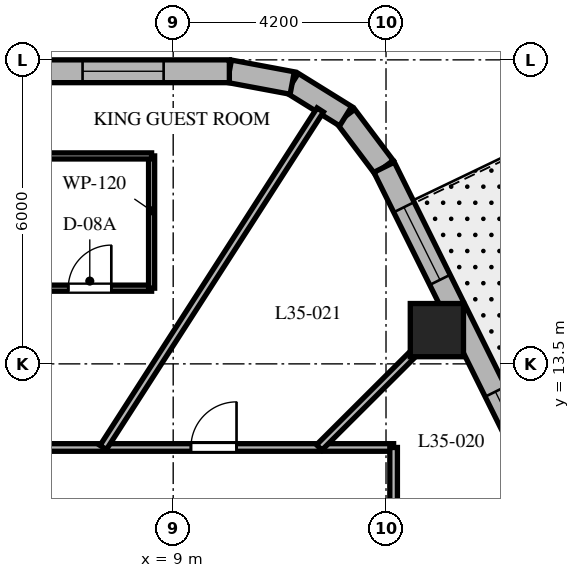
"""IFC4 building model, lengths in metres.
Left out: names, types, materials, properties, quantities, classifications, styles, units other than length and angle.
Written with IfcOpenShell. Run it as: python <this file> out.ifc"""

import sys

from ifc_helpers import new_model, si_unit, direction, frame, frame_2d, origin, origin_2d, place, context, subcontext, project, spatial, rectangle, extrude, element, fill, save


model = new_model("IFC4")
c1 = context("Model", 3, precision=1e-05, world=origin(), true_north=direction((0.0, 1.0)))
c2 = subcontext(c1, "Body", "Model", "MODEL_VIEW")
j1 = project(units=[si_unit("LENGTHUNIT", "METRE"), si_unit("PLANEANGLEUNIT", "RADIAN")], contexts=[c1])
p1 = place(None, origin())
s1 = spatial("IfcSite", under=j1, at=p1, CompositionType="ELEMENT")
p2 = place(p1, origin())
s2 = spatial("IfcBuilding", under=s1, at=p2, CompositionType="ELEMENT")
p3 = place(p2, frame((0.0, 0.0, 144.3)))
s3 = spatial("IfcBuildingStorey", under=s2, at=p3, CompositionType="ELEMENT", Elevation=144.3)
p4 = place(p3, frame((14.204, 14.166, 0.0), z_axis=(0.0, 0.0, 1.0), x_axis=(1.0, 0.0, 0.0)))
e1 = element("IfcColumn", 1, at=p4, inside=s3, PredefinedType="COLUMN", context=c2, shape_type="SweptSolid", body=[
    extrude(rectangle(XDim=1.05, YDim=1.05, at=origin_2d()), origin(), (0.0, 0.0, 1.0), 3.7),
])
p5 = place(p3, frame((13.162, 17.381, 0.0), z_axis=(0.0, 0.0, 1.0), x_axis=(-0.601515770517, 0.798860925205, 0.0)))
e2 = element("IfcWall", 2, at=p5, inside=s3, PredefinedType="SOLIDWALL", context=c2, shape_type="SweptSolid", body=[
    extrude(rectangle(XDim=1.262, YDim=0.45, at=frame_2d((0.631, 0.0))), origin(), (0.0, 0.0, 1.0), 3.4),
])
p6 = place(p3, frame((12.403, 18.389, 0.0), z_axis=(0.0, 0.0, 1.0), x_axis=(-0.849795170926, 0.527113049991, 0.0)))
e3 = element("IfcWall", 3, at=p6, inside=s3, PredefinedType="SOLIDWALL", context=c2, shape_type="SweptSolid", body=[
    extrude(rectangle(XDim=1.241, YDim=0.45, at=frame_2d((0.62, 0.0))), origin(), (0.0, 0.0, 1.0), 3.4),
])
p7 = place(p3, frame((11.349, 19.043, 0.0), z_axis=(0.0, 0.0, 1.0), x_axis=(-0.982931267051, 0.183973161772, 0.0)))
e4 = element("IfcWall", 4, at=p7, inside=s3, PredefinedType="SOLIDWALL", context=c2, shape_type="SweptSolid", body=[
    extrude(rectangle(XDim=1.262, YDim=0.45, at=frame_2d((0.631, 0.0))), origin(), (0.0, 0.0, 1.0), 3.4),
])
p8 = place(p3, frame((20.618, 2.344, 0.0), z_axis=(0.0, 0.0, 1.0), x_axis=(-0.444243691097, 0.895905990002, 0.0)))
e5 = element("IfcWall", 5, at=p8, inside=s3, PredefinedType="SOLIDWALL", context=c2, shape_type="SweptSolid", body=[
    extrude(rectangle(XDim=16.784, YDim=0.45, at=frame_2d((8.392, 0.0))), origin(), (0.0, 0.0, 1.0), 3.4),
])
p9 = place(p8, frame((4.535, 0.0, 0.0)))
e6 = element("IfcOpeningElement", 6, at=p9, cuts=e5, PredefinedType="OPENING", context=c2, shape_type="SweptSolid", body=[
    extrude(rectangle(XDim=1.0, YDim=2.15, at=frame_2d((0.5, 1.075))), frame((0.0, 0.235, 0.0), z_axis=(0.0, -1.0, 0.0), x_axis=(1.0, 0.0, 0.0)), (0.0, 0.0, 1.0), 0.47),
])
p10 = place(p8, frame((0.931, 0.0, 0.8)))
e7 = element("IfcOpeningElement", 7, at=p10, cuts=e5, PredefinedType="OPENING", context=c2, shape_type="SweptSolid", body=[
    extrude(rectangle(XDim=1.6, YDim=1.75, at=frame_2d((0.8, 0.875))), frame((0.0, 0.235, 0.0), z_axis=(0.0, -1.0, 0.0), x_axis=(1.0, 0.0, 0.0)), (0.0, 0.0, 1.0), 0.47),
])
p11 = place(p8, frame((6.25, 0.0, 0.8)))
e8 = element("IfcOpeningElement", 8, at=p11, cuts=e5, PredefinedType="OPENING", context=c2, shape_type="SweptSolid", body=[
    extrude(rectangle(XDim=1.6, YDim=1.75, at=frame_2d((0.8, 0.875))), frame((0.0, 0.235, 0.0), z_axis=(0.0, -1.0, 0.0), x_axis=(1.0, 0.0, 0.0)), (0.0, 0.0, 1.0), 0.47),
])
p12 = place(p8, frame((10.24, 0.0, 0.8)))
e9 = element("IfcOpeningElement", 9, at=p12, cuts=e5, PredefinedType="OPENING", context=c2, shape_type="SweptSolid", body=[
    extrude(rectangle(XDim=1.6, YDim=1.75, at=frame_2d((0.8, 0.875))), frame((0.0, 0.235, 0.0), z_axis=(0.0, -1.0, 0.0), x_axis=(1.0, 0.0, 0.0)), (0.0, 0.0, 1.0), 0.47),
])
p13 = place(p8, frame((14.303, 0.0, 0.8)))
e10 = element("IfcOpeningElement", 10, at=p13, cuts=e5, PredefinedType="OPENING", context=c2, shape_type="SweptSolid", body=[
    extrude(rectangle(XDim=1.6, YDim=1.75, at=frame_2d((0.8, 0.875))), frame((0.0, 0.235, 0.0), z_axis=(0.0, -1.0, 0.0), x_axis=(1.0, 0.0, 0.0)), (0.0, 0.0, 1.0), 0.47),
])
p14 = place(p3, frame((10.108, 19.275, 0.0), z_axis=(0.0, 0.0, 1.0), x_axis=(-1.0, 0.0, 0.0)))
e11 = element("IfcWall", 11, at=p14, inside=s3, PredefinedType="SOLIDWALL", context=c2, shape_type="SweptSolid", body=[
    extrude(rectangle(XDim=21.829, YDim=0.45, at=frame_2d((10.915, 0.0))), origin(), (0.0, 0.0, 1.0), 3.4),
])
p15 = place(p14, frame((1.297, 0.0, 0.8)))
e12 = element("IfcOpeningElement", 12, at=p15, cuts=e11, PredefinedType="OPENING", context=c2, shape_type="SweptSolid", body=[
    extrude(rectangle(XDim=1.6, YDim=1.75, at=frame_2d((0.8, 0.875))), frame((0.0, 0.235, 0.0), z_axis=(0.0, -1.0, 0.0), x_axis=(1.0, 0.0, 0.0)), (0.0, 0.0, 1.0), 0.47),
])
p16 = place(p14, frame((10.115, 0.0, 0.8)))
e13 = element("IfcOpeningElement", 13, at=p16, cuts=e11, PredefinedType="OPENING", context=c2, shape_type="SweptSolid", body=[
    extrude(rectangle(XDim=1.6, YDim=1.75, at=frame_2d((0.8, 0.875))), frame((0.0, 0.235, 0.0), z_axis=(0.0, -1.0, 0.0), x_axis=(1.0, 0.0, 0.0)), (0.0, 0.0, 1.0), 0.47),
])
p17 = place(p14, frame((18.933, 0.0, 0.8)))
e14 = element("IfcOpeningElement", 14, at=p17, cuts=e11, PredefinedType="OPENING", context=c2, shape_type="SweptSolid", body=[
    extrude(rectangle(XDim=1.6, YDim=1.75, at=frame_2d((0.8, 0.875))), frame((0.0, 0.235, 0.0), z_axis=(0.0, -1.0, 0.0), x_axis=(1.0, 0.0, 0.0)), (0.0, 0.0, 1.0), 0.47),
])
p18 = place(p3, frame((-13.35, 11.85, 0.0), z_axis=(0.0, 0.0, 1.0), x_axis=(1.0, 0.0, 0.0)))
e15 = element("IfcWall", 15, at=p18, inside=s3, PredefinedType="PARTITIONING", context=c2, shape_type="SweptSolid", body=[
    extrude(rectangle(XDim=26.7, YDim=0.15, at=frame_2d((13.35, 0.0))), origin(), (0.0, 0.0, 1.0), 2.84),
])
p19 = place(p18, frame((22.7, 0.0, 0.0)))
e16 = element("IfcOpeningElement", 16, at=p19, cuts=e15, PredefinedType="OPENING", context=c2, shape_type="SweptSolid", body=[
    extrude(rectangle(XDim=0.9, YDim=2.03, at=frame_2d((0.45, 1.015))), frame((0.0, 0.085, 0.0), z_axis=(0.0, -1.0, 0.0), x_axis=(1.0, 0.0, 0.0)), (0.0, 0.0, 1.0), 0.17),
])
p20 = place(p18, frame((18.523, 0.0, 0.0)))
e17 = element("IfcOpeningElement", 17, at=p20, cuts=e15, PredefinedType="OPENING", context=c2, shape_type="SweptSolid", body=[
    extrude(rectangle(XDim=0.95, YDim=2.03, at=frame_2d((0.475, 1.015))), frame((0.0, 0.085, 0.0), z_axis=(0.0, -1.0, 0.0), x_axis=(1.0, 0.0, 0.0)), (0.0, 0.0, 1.0), 0.17),
])
p21 = place(p18, frame((12.362, 0.0, 0.0)))
e18 = element("IfcOpeningElement", 18, at=p21, cuts=e15, PredefinedType="OPENING", context=c2, shape_type="SweptSolid", body=[
    extrude(rectangle(XDim=0.95, YDim=2.03, at=frame_2d((0.475, 1.015))), frame((0.0, 0.085, 0.0), z_axis=(0.0, -1.0, 0.0), x_axis=(1.0, 0.0, 0.0)), (0.0, 0.0, 1.0), 0.17),
])
p22 = place(p18, frame((6.061, 0.0, 0.0)))
e19 = element("IfcOpeningElement", 19, at=p22, cuts=e15, PredefinedType="OPENING", context=c2, shape_type="SweptSolid", body=[
    extrude(rectangle(XDim=0.95, YDim=2.03, at=frame_2d((0.475, 1.015))), frame((0.0, 0.085, 0.0), z_axis=(0.0, -1.0, 0.0), x_axis=(1.0, 0.0, 0.0)), (0.0, 0.0, 1.0), 0.17),
])
p23 = place(p18, frame((1.886, 0.0, 0.0)))
e20 = element("IfcOpeningElement", 20, at=p23, cuts=e15, PredefinedType="OPENING", context=c2, shape_type="SweptSolid", body=[
    extrude(rectangle(XDim=0.9, YDim=2.03, at=frame_2d((0.45, 1.015))), frame((0.0, 0.085, 0.0), z_axis=(0.0, -1.0, 0.0), x_axis=(1.0, 0.0, 0.0)), (0.0, 0.0, 1.0), 0.17),
])
p24 = place(p3, frame((13.35, 11.85, 0.0), z_axis=(0.0, 0.0, 1.0), x_axis=(0.0, -1.0, 0.0)))
e21 = element("IfcWall", 21, at=p24, inside=s3, PredefinedType="PARTITIONING", context=c2, shape_type="SweptSolid", body=[
    extrude(rectangle(XDim=23.7, YDim=0.15, at=frame_2d((11.85, 0.0))), origin(), (0.0, 0.0, 1.0), 2.84),
])
p25 = place(p24, frame((9.27, 0.0, 0.0)))
e22 = element("IfcOpeningElement", 22, at=p25, cuts=e21, PredefinedType="OPENING", context=c2, shape_type="SweptSolid", body=[
    extrude(rectangle(XDim=0.9, YDim=2.03, at=frame_2d((0.45, 1.015))), frame((0.0, 0.085, 0.0), z_axis=(0.0, -1.0, 0.0), x_axis=(1.0, 0.0, 0.0)), (0.0, 0.0, 1.0), 0.17),
])
p26 = place(p24, frame((5.393, 0.0, 0.0)))
e23 = element("IfcOpeningElement", 23, at=p26, cuts=e21, PredefinedType="OPENING", context=c2, shape_type="SweptSolid", body=[
    extrude(rectangle(XDim=0.9, YDim=2.03, at=frame_2d((0.45, 1.015))), frame((0.0, 0.085, 0.0), z_axis=(0.0, -1.0, 0.0), x_axis=(1.0, 0.0, 0.0)), (0.0, 0.0, 1.0), 0.17),
])
p27 = place(p24, frame((1.439, 0.0, 0.0)))
e24 = element("IfcOpeningElement", 24, at=p27, cuts=e21, PredefinedType="OPENING", context=c2, shape_type="SweptSolid", body=[
    extrude(rectangle(XDim=0.9, YDim=2.03, at=frame_2d((0.45, 1.015))), frame((0.0, 0.085, 0.0), z_axis=(0.0, -1.0, 0.0), x_axis=(1.0, 0.0, 0.0)), (0.0, 0.0, 1.0), 0.17),
])
p28 = place(p24, frame((18.389, 0.0, 0.0)))
e25 = element("IfcOpeningElement", 25, at=p28, cuts=e21, PredefinedType="OPENING", context=c2, shape_type="SweptSolid", body=[
    extrude(rectangle(XDim=0.95, YDim=2.03, at=frame_2d((0.475, 1.015))), frame((0.0, 0.085, 0.0), z_axis=(0.0, -1.0, 0.0), x_axis=(1.0, 0.0, 0.0)), (0.0, 0.0, 1.0), 0.17),
])
p29 = place(p24, frame((12.315, 0.0, 0.0)))
e26 = element("IfcOpeningElement", 26, at=p29, cuts=e21, PredefinedType="OPENING", context=c2, shape_type="SweptSolid", body=[
    extrude(rectangle(XDim=0.9, YDim=2.03, at=frame_2d((0.45, 1.015))), frame((0.0, 0.085, 0.0), z_axis=(0.0, -1.0, 0.0), x_axis=(1.0, 0.0, 0.0)), (0.0, 0.0, 1.0), 0.17),
])
p30 = place(p3, frame((11.882, 11.85, 0.0), z_axis=(0.0, 0.0, 1.0), x_axis=(0.708037373639, 0.706174962407, 0.0)))
e27 = element("IfcWall", 27, at=p30, inside=s3, PredefinedType="PARTITIONING", context=c2, shape_type="SweptSolid", body=[
    extrude(rectangle(XDim=3.802, YDim=0.15, at=frame_2d((1.901, 0.0))), origin(), (0.0, 0.0, 1.0), 2.64),
])
p31 = place(p3, frame((7.619, 11.85, 0.0), z_axis=(0.0, 0.0, 1.0), x_axis=(0.540829263478, 0.841132396098, 0.0)))
e28 = element("IfcWall", 28, at=p31, inside=s3, PredefinedType="PARTITIONING", context=c2, shape_type="SweptSolid", body=[
    extrude(rectangle(XDim=7.919, YDim=0.15, at=frame_2d((3.959, 0.0))), origin(), (0.0, 0.0, 1.0), 2.64),
])
p32 = place(p3, frame((6.134, 14.994, 0.0), z_axis=(0.0, 0.0, 1.0), x_axis=(1.0, 0.0, 0.0)))
e29 = element("IfcWall", 29, at=p32, inside=s3, PredefinedType="PARTITIONING", context=c2, shape_type="SweptSolid", body=[
    extrude(rectangle(XDim=2.44, YDim=0.12, at=frame_2d((1.22, 0.0))), origin(), (0.0, 0.0, 1.0), 3.4),
])
p33 = place(p32, frame((0.795, 0.0, 0.0)))
e30 = element("IfcOpeningElement", 30, at=p33, cuts=e29, PredefinedType="OPENING", context=c2, shape_type="SweptSolid", body=[
    extrude(rectangle(XDim=0.85, YDim=2.03, at=frame_2d((0.425, 1.015))), frame((0.0, 0.07, 0.0), z_axis=(0.0, -1.0, 0.0), x_axis=(1.0, 0.0, 0.0)), (0.0, 0.0, 1.0), 0.14),
])
p34 = place(p3, frame((8.574, 14.994, 0.0), z_axis=(0.0, 0.0, 1.0), x_axis=(0.0, 1.0, 0.0)))
e31 = element("IfcWall", 31, at=p34, inside=s3, PredefinedType="PARTITIONING", context=c2, shape_type="SweptSolid", body=[
    extrude(rectangle(XDim=2.61, YDim=0.12, at=frame_2d((1.305, 0.0))), origin(), (0.0, 0.0, 1.0), 2.64),
])
p35 = place(p3, frame((8.574, 17.604, 0.0), z_axis=(0.0, 0.0, 1.0), x_axis=(-1.0, 0.0, 0.0)))
e32 = element("IfcWall", 32, at=p35, inside=s3, PredefinedType="PARTITIONING", context=c2, shape_type="SweptSolid", body=[
    extrude(rectangle(XDim=2.44, YDim=0.12, at=frame_2d((1.22, 0.0))), origin(), (0.0, 0.0, 1.0), 2.64),
])
p36 = place(p12, origin())
e33 = element("IfcWindow", 33, at=p36, inside=s3, PartitioningType="SINGLE_PANEL", PredefinedType="WINDOW", context=c2, shape_type="SweptSolid", body=[
    extrude(rectangle(XDim=1.6, YDim=1.75, at=frame_2d((0.8, 0.875))), frame((0.0, 0.03, 0.0), z_axis=(0.0, -1.0, 0.0), x_axis=(1.0, 0.0, 0.0)), (0.0, 0.0, 1.0), 0.06),
])
fill(e9, e33)
p37 = place(p13, origin())
e34 = element("IfcWindow", 34, at=p37, inside=s3, PartitioningType="SINGLE_PANEL", PredefinedType="WINDOW", context=c2, shape_type="SweptSolid", body=[
    extrude(rectangle(XDim=1.6, YDim=1.75, at=frame_2d((0.8, 0.875))), frame((0.0, 0.03, 0.0), z_axis=(0.0, -1.0, 0.0), x_axis=(1.0, 0.0, 0.0)), (0.0, 0.0, 1.0), 0.06),
])
fill(e10, e34)
p38 = place(p15, origin())
e35 = element("IfcWindow", 35, at=p38, inside=s3, PartitioningType="SINGLE_PANEL", PredefinedType="WINDOW", context=c2, shape_type="SweptSolid", body=[
    extrude(rectangle(XDim=1.6, YDim=1.75, at=frame_2d((0.8, 0.875))), frame((0.0, 0.03, 0.0), z_axis=(0.0, -1.0, 0.0), x_axis=(1.0, 0.0, 0.0)), (0.0, 0.0, 1.0), 0.06),
])
fill(e12, e35)
p39 = place(p19, origin())
e36 = element("IfcDoor", 36, at=p39, inside=s3, OperationType="SINGLE_SWING_RIGHT", PredefinedType="DOOR", context=c2, shape_type="SweptSolid", body=[
    extrude(rectangle(XDim=0.9, YDim=2.03, at=frame_2d((0.45, 1.015))), frame((0.0, 0.025, 0.0), z_axis=(0.0, -1.0, 0.0), x_axis=(1.0, 0.0, 0.0)), (0.0, 0.0, 1.0), 0.05),
])
fill(e16, e36)
p40 = place(p33, origin())
e37 = element("IfcDoor", 37, at=p40, inside=s3, OperationType="SINGLE_SWING_RIGHT", PredefinedType="DOOR", context=c2, shape_type="SweptSolid", body=[
    extrude(rectangle(XDim=0.85, YDim=2.03, at=frame_2d((0.425, 1.015))), frame((0.0, 0.025, 0.0), z_axis=(0.0, -1.0, 0.0), x_axis=(1.0, 0.0, 0.0)), (0.0, 0.0, 1.0), 0.05),
])
fill(e30, e37)
save(model, sys.argv[1])
